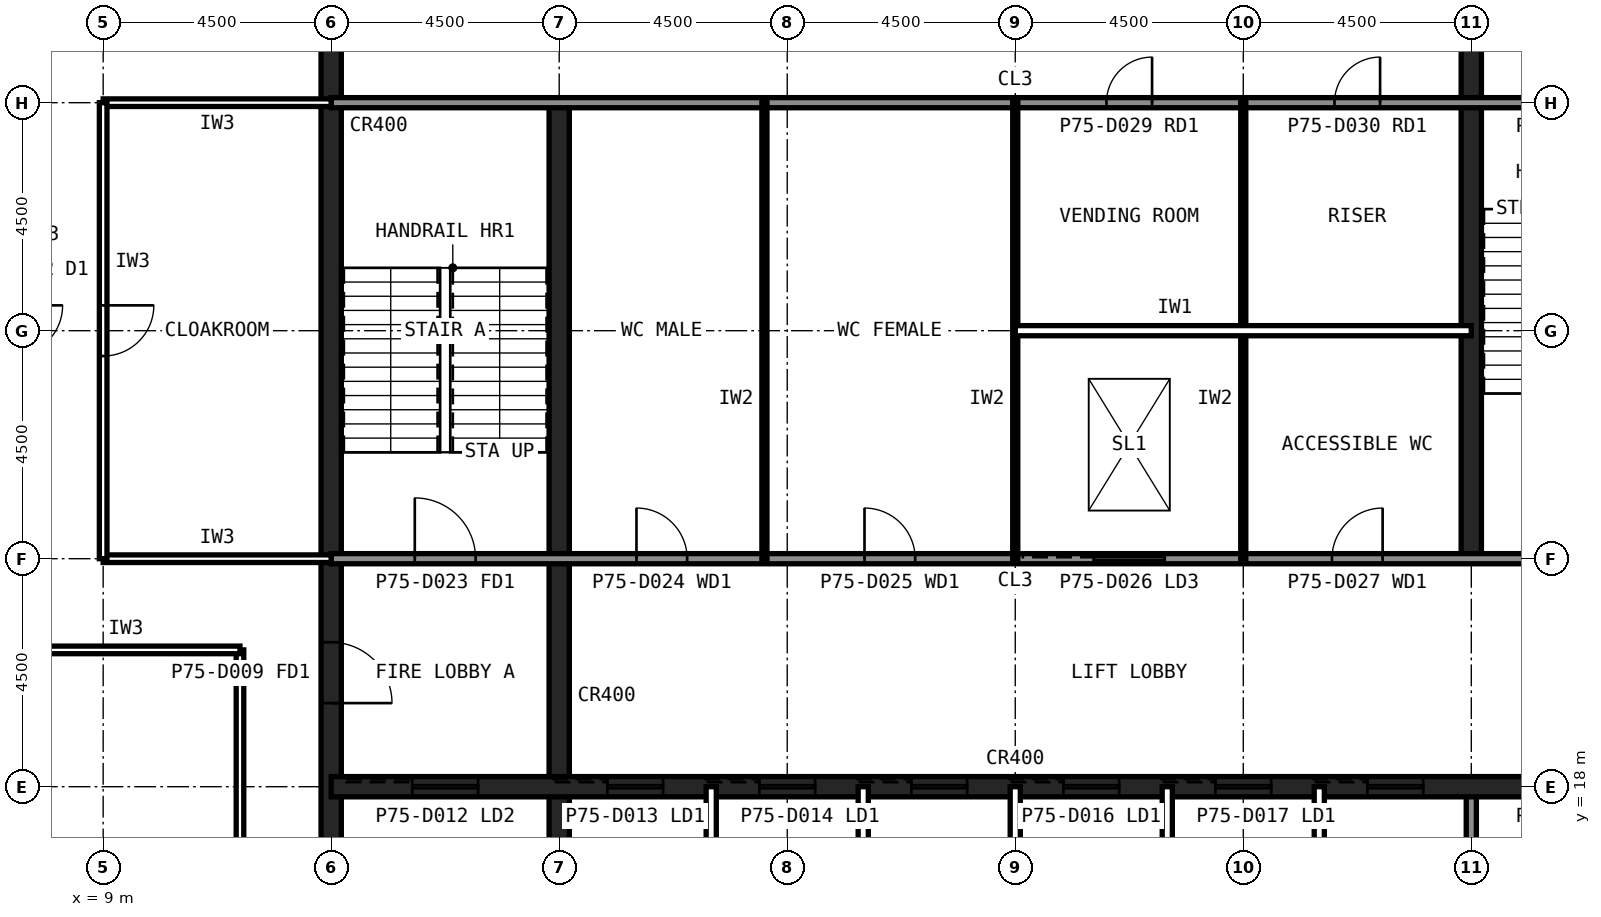
"""IFC4 building model, lengths in metres.
Left out: names, types, materials, properties, quantities, classifications, styles, units other than length and angle.
Written with IfcOpenShell. Run it as: python <this file> out.ifc"""

import sys

from ifc_helpers import new_model, si_unit, direction, frame, frame_2d, origin, place, context, subcontext, project, spatial, rectangle, extrude, element, fill, save


model = new_model("IFC4")
c1 = context("Model", 3, precision=1e-05, world=origin(), true_north=direction((0.0, 1.0)))
c2 = subcontext(c1, "Body", "Model", "MODEL_VIEW")
j1 = project(units=[si_unit("LENGTHUNIT", "METRE"), si_unit("PLANEANGLEUNIT", "RADIAN")], contexts=[c1])
p1 = place(None, origin())
s1 = spatial("IfcSite", under=j1, at=p1, CompositionType="ELEMENT")
p2 = place(p1, origin())
s2 = spatial("IfcBuilding", under=s1, at=p2, CompositionType="ELEMENT")
p3 = place(p2, frame((0.0, 0.0, 315.1)))
s3 = spatial("IfcBuildingStorey", under=s2, at=p3, CompositionType="ELEMENT", Elevation=315.1)
p4 = place(p3, frame((13.5, 40.5, 0.0), z_axis=(0.0, 0.0, 1.0), x_axis=(0.0, -1.0, 0.0)))
e1 = element("IfcWall", 1, at=p4, inside=s3, PredefinedType="SHEAR", context=c2, shape_type="SweptSolid", body=[
    extrude(rectangle(XDim=27.0, YDim=0.4, at=frame_2d((13.5, 0.0))), origin(), (0.0, 0.0, 1.0), 5.0),
])
p5 = place(p4, frame((19.65, 0.0, 0.0)))
e2 = element("IfcOpeningElement", 2, at=p5, cuts=e1, PredefinedType="OPENING", context=c2, shape_type="SweptSolid", body=[
    extrude(rectangle(XDim=1.2, YDim=2.1, at=frame_2d((0.6, 1.05))), frame((0.0, 0.21, 0.0), z_axis=(0.0, -1.0, 0.0), x_axis=(1.0, 0.0, 0.0)), (0.0, 0.0, 1.0), 0.42),
])
p6 = place(p4, frame((5.85, 0.0, 0.0)))
e3 = element("IfcOpeningElement", 3, at=p6, cuts=e1, PredefinedType="OPENING", context=c2, shape_type="SweptSolid", body=[
    extrude(rectangle(XDim=1.8, YDim=2.1, at=frame_2d((0.9, 1.05))), frame((0.0, 0.21, 0.0), z_axis=(0.0, -1.0, 0.0), x_axis=(1.0, 0.0, 0.0)), (0.0, 0.0, 1.0), 0.42),
])
p7 = place(p3, frame((18.0, 13.5, 0.0), z_axis=(0.0, 0.0, 1.0), x_axis=(0.0, 1.0, 0.0)))
e4 = element("IfcWall", 4, at=p7, inside=s3, PredefinedType="SHEAR", context=c2, shape_type="SweptSolid", body=[
    extrude(rectangle(XDim=18.0, YDim=0.4, at=frame_2d((9.0, 0.0))), origin(), (0.0, 0.0, 1.0), 5.0),
])
p8 = place(p3, frame((36.0, 13.5, 0.0), z_axis=(0.0, 0.0, 1.0), x_axis=(0.0, 1.0, 0.0)))
e5 = element("IfcWall", 5, at=p8, inside=s3, PredefinedType="SOLIDWALL", context=c2, shape_type="SweptSolid", body=[
    extrude(rectangle(XDim=4.5, YDim=0.2, at=frame_2d((2.25, 0.0))), origin(), (0.0, 0.0, 1.0), 4.8),
])
p9 = place(p3, frame((36.0, 22.5, 0.0), z_axis=(0.0, 0.0, 1.0), x_axis=(0.0, 1.0, 0.0)))
e6 = element("IfcWall", 6, at=p9, inside=s3, PredefinedType="SHEAR", context=c2, shape_type="SweptSolid", body=[
    extrude(rectangle(XDim=18.0, YDim=0.4, at=frame_2d((9.0, 0.0))), origin(), (0.0, 0.0, 1.0), 5.0),
])
p10 = place(p3, frame((13.5, 18.0, 0.0), z_axis=(0.0, 0.0, 1.0), x_axis=(1.0, 0.0, 0.0)))
e7 = element("IfcWall", 7, at=p10, inside=s3, PredefinedType="SHEAR", context=c2, shape_type="SweptSolid", body=[
    extrude(rectangle(XDim=27.0, YDim=0.4, at=frame_2d((13.5, 0.0))), origin(), (0.0, 0.0, 1.0), 5.0),
])
p11 = place(p10, frame((24.3, 0.0, 0.0)))
e8 = element("IfcOpeningElement", 8, at=p11, cuts=e7, PredefinedType="OPENING", context=c2, shape_type="SweptSolid", body=[
    extrude(rectangle(XDim=0.9, YDim=2.1, at=frame_2d((0.45, 1.05))), frame((0.0, 0.21, 0.0), z_axis=(0.0, -1.0, 0.0), x_axis=(1.0, 0.0, 0.0)), (0.0, 0.0, 1.0), 0.42),
])
p12 = place(p10, frame((5.45, 0.0, 0.0)))
e9 = element("IfcOpeningElement", 9, at=p12, cuts=e7, PredefinedType="OPENING", context=c2, shape_type="SweptSolid", body=[
    extrude(rectangle(XDim=1.1, YDim=2.1, at=frame_2d((0.55, 1.05))), frame((0.0, 0.21, 0.0), z_axis=(0.0, -1.0, 0.0), x_axis=(1.0, 0.0, 0.0)), (0.0, 0.0, 1.0), 0.42),
])
p13 = place(p10, frame((8.45, 0.0, 0.0)))
e10 = element("IfcOpeningElement", 10, at=p13, cuts=e7, PredefinedType="OPENING", context=c2, shape_type="SweptSolid", body=[
    extrude(rectangle(XDim=1.1, YDim=2.1, at=frame_2d((0.55, 1.05))), frame((0.0, 0.21, 0.0), z_axis=(0.0, -1.0, 0.0), x_axis=(1.0, 0.0, 0.0)), (0.0, 0.0, 1.0), 0.42),
])
p14 = place(p10, frame((11.45, 0.0, 0.0)))
e11 = element("IfcOpeningElement", 11, at=p14, cuts=e7, PredefinedType="OPENING", context=c2, shape_type="SweptSolid", body=[
    extrude(rectangle(XDim=1.1, YDim=2.1, at=frame_2d((0.55, 1.05))), frame((0.0, 0.21, 0.0), z_axis=(0.0, -1.0, 0.0), x_axis=(1.0, 0.0, 0.0)), (0.0, 0.0, 1.0), 0.42),
])
p15 = place(p10, frame((14.45, 0.0, 0.0)))
e12 = element("IfcOpeningElement", 12, at=p15, cuts=e7, PredefinedType="OPENING", context=c2, shape_type="SweptSolid", body=[
    extrude(rectangle(XDim=1.1, YDim=2.1, at=frame_2d((0.55, 1.05))), frame((0.0, 0.21, 0.0), z_axis=(0.0, -1.0, 0.0), x_axis=(1.0, 0.0, 0.0)), (0.0, 0.0, 1.0), 0.42),
])
p16 = place(p10, frame((17.45, 0.0, 0.0)))
e13 = element("IfcOpeningElement", 13, at=p16, cuts=e7, PredefinedType="OPENING", context=c2, shape_type="SweptSolid", body=[
    extrude(rectangle(XDim=1.1, YDim=2.1, at=frame_2d((0.55, 1.05))), frame((0.0, 0.21, 0.0), z_axis=(0.0, -1.0, 0.0), x_axis=(1.0, 0.0, 0.0)), (0.0, 0.0, 1.0), 0.42),
])
p17 = place(p10, frame((20.45, 0.0, 0.0)))
e14 = element("IfcOpeningElement", 14, at=p17, cuts=e7, PredefinedType="OPENING", context=c2, shape_type="SweptSolid", body=[
    extrude(rectangle(XDim=1.1, YDim=2.1, at=frame_2d((0.55, 1.05))), frame((0.0, 0.21, 0.0), z_axis=(0.0, -1.0, 0.0), x_axis=(1.0, 0.0, 0.0)), (0.0, 0.0, 1.0), 0.42),
])
p18 = place(p10, frame((1.6, 0.0, 0.0)))
e15 = element("IfcOpeningElement", 15, at=p18, cuts=e7, PredefinedType="OPENING", context=c2, shape_type="SweptSolid", body=[
    extrude(rectangle(XDim=1.3, YDim=2.2, at=frame_2d((0.65, 1.1))), frame((0.0, 0.21, 0.0), z_axis=(0.0, -1.0, 0.0), x_axis=(1.0, 0.0, 0.0)), (0.0, 0.0, 1.0), 0.42),
])
p19 = place(p3, frame((13.5, 22.5, 0.0), z_axis=(0.0, 0.0, 1.0), x_axis=(1.0, 0.0, 0.0)))
e16 = element("IfcWall", 16, at=p19, inside=s3, PredefinedType="SOLIDWALL", context=c2, shape_type="SweptSolid", body=[
    extrude(rectangle(XDim=27.0, YDim=0.2, at=frame_2d((13.5, 0.0))), origin(), (0.0, 0.0, 1.0), 4.8),
])
p20 = place(p19, frame((1.65, 0.0, 0.0)))
e17 = element("IfcOpeningElement", 17, at=p20, cuts=e16, PredefinedType="OPENING", context=c2, shape_type="SweptSolid", body=[
    extrude(rectangle(XDim=1.2, YDim=2.1, at=frame_2d((0.6, 1.05))), frame((0.0, 0.11, 0.0), z_axis=(0.0, -1.0, 0.0), x_axis=(1.0, 0.0, 0.0)), (0.0, 0.0, 1.0), 0.22),
])
p21 = place(p19, frame((6.025, 0.0, 0.0)))
e18 = element("IfcOpeningElement", 18, at=p21, cuts=e16, PredefinedType="OPENING", context=c2, shape_type="SweptSolid", body=[
    extrude(rectangle(XDim=1.0, YDim=2.1, at=frame_2d((0.5, 1.05))), frame((0.0, 0.11, 0.0), z_axis=(0.0, -1.0, 0.0), x_axis=(1.0, 0.0, 0.0)), (0.0, 0.0, 1.0), 0.22),
])
p22 = place(p19, frame((10.525, 0.0, 0.0)))
e19 = element("IfcOpeningElement", 19, at=p22, cuts=e16, PredefinedType="OPENING", context=c2, shape_type="SweptSolid", body=[
    extrude(rectangle(XDim=1.0, YDim=2.1, at=frame_2d((0.5, 1.05))), frame((0.0, 0.11, 0.0), z_axis=(0.0, -1.0, 0.0), x_axis=(1.0, 0.0, 0.0)), (0.0, 0.0, 1.0), 0.22),
])
p23 = place(p19, frame((19.75, 0.0, 0.0)))
e20 = element("IfcOpeningElement", 20, at=p23, cuts=e16, PredefinedType="OPENING", context=c2, shape_type="SweptSolid", body=[
    extrude(rectangle(XDim=1.0, YDim=2.1, at=frame_2d((0.5, 1.05))), frame((0.0, 0.11, 0.0), z_axis=(0.0, -1.0, 0.0), x_axis=(1.0, 0.0, 0.0)), (0.0, 0.0, 1.0), 0.22),
])
p24 = place(p19, frame((15.05, 0.0, 0.0)))
e21 = element("IfcOpeningElement", 21, at=p24, cuts=e16, PredefinedType="OPENING", context=c2, shape_type="SweptSolid", body=[
    extrude(rectangle(XDim=1.4, YDim=2.4, at=frame_2d((0.7, 1.2))), frame((0.0, 0.11, 0.0), z_axis=(0.0, -1.0, 0.0), x_axis=(1.0, 0.0, 0.0)), (0.0, 0.0, 1.0), 0.22),
])
p25 = place(p3, frame((13.5, 31.5, 0.0), z_axis=(0.0, 0.0, 1.0), x_axis=(1.0, 0.0, 0.0)))
e22 = element("IfcWall", 22, at=p25, inside=s3, PredefinedType="SOLIDWALL", context=c2, shape_type="SweptSolid", body=[
    extrude(rectangle(XDim=27.0, YDim=0.2, at=frame_2d((13.5, 0.0))), origin(), (0.0, 0.0, 1.0), 4.8),
])
p26 = place(p25, frame((24.15, 0.0, 0.0)))
e23 = element("IfcOpeningElement", 23, at=p26, cuts=e22, PredefinedType="OPENING", context=c2, shape_type="SweptSolid", body=[
    extrude(rectangle(XDim=1.2, YDim=2.1, at=frame_2d((0.6, 1.05))), frame((0.0, 0.11, 0.0), z_axis=(0.0, -1.0, 0.0), x_axis=(1.0, 0.0, 0.0)), (0.0, 0.0, 1.0), 0.22),
])
p27 = place(p25, frame((15.3, 0.0, 0.0)))
e24 = element("IfcOpeningElement", 24, at=p27, cuts=e22, PredefinedType="OPENING", context=c2, shape_type="SweptSolid", body=[
    extrude(rectangle(XDim=0.9, YDim=2.1, at=frame_2d((0.45, 1.05))), frame((0.0, 0.11, 0.0), z_axis=(0.0, -1.0, 0.0), x_axis=(1.0, 0.0, 0.0)), (0.0, 0.0, 1.0), 0.22),
])
p28 = place(p25, frame((19.8, 0.0, 0.0)))
e25 = element("IfcOpeningElement", 25, at=p28, cuts=e22, PredefinedType="OPENING", context=c2, shape_type="SweptSolid", body=[
    extrude(rectangle(XDim=0.9, YDim=2.1, at=frame_2d((0.45, 1.05))), frame((0.0, 0.11, 0.0), z_axis=(0.0, -1.0, 0.0), x_axis=(1.0, 0.0, 0.0)), (0.0, 0.0, 1.0), 0.22),
])
for number, where, z_axis, x_axis in (
    (26, (21.0, 13.5, 0.0), (0.0, 0.0, 1.0), (0.0, 1.0, 0.0)),
    (27, (24.0, 13.5, 0.0), (0.0, 0.0, 1.0), (0.0, 1.0, 0.0)),
    (28, (27.0, 13.5, 0.0), (0.0, 0.0, 1.0), (0.0, 1.0, 0.0)),
    (29, (30.0, 13.5, 0.0), (0.0, 0.0, 1.0), (0.0, 1.0, 0.0)),
    (30, (33.0, 13.5, 0.0), (0.0, 0.0, 1.0), (0.0, 1.0, 0.0)),
):
    element("IfcWall", number, at=place(p3, frame(where, z_axis=z_axis, x_axis=x_axis)), inside=s3, PredefinedType="PARTITIONING", context=c2, shape_type="SweptSolid", body=[
        extrude(rectangle(XDim=4.5, YDim=0.2, at=frame_2d((2.25, 0.0))), origin(), (0.0, 0.0, 1.0), 4.8),
    ])
for number, where, z_axis, x_axis in (
    (31, (22.05, 22.5, 0.0), (0.0, 0.0, 1.0), (0.0, 1.0, 0.0)),
    (32, (27.0, 22.5, 0.0), (0.0, 0.0, 1.0), (0.0, 1.0, 0.0)),
    (33, (31.5, 22.5, 0.0), (0.0, 0.0, 1.0), (0.0, 1.0, 0.0)),
):
    element("IfcWall", number, at=place(p3, frame(where, z_axis=z_axis, x_axis=x_axis)), inside=s3, PredefinedType="PLUMBINGWALL", context=c2, shape_type="SweptSolid", body=[
        extrude(rectangle(XDim=9.0, YDim=0.1, at=frame_2d((4.5, 0.0))), origin(), (0.0, 0.0, 1.0), 4.8),
    ])
p29 = place(p3, frame((27.0, 27.0, 0.0), z_axis=(0.0, 0.0, 1.0), x_axis=(1.0, 0.0, 0.0)))
e34 = element("IfcWall", 34, at=p29, inside=s3, PredefinedType="PARTITIONING", context=c2, shape_type="SweptSolid", body=[
    extrude(rectangle(XDim=9.0, YDim=0.2, at=frame_2d((4.5, 0.0))), origin(), (0.0, 0.0, 1.0), 4.8),
])
p30 = place(p3, frame((11.7, 20.7, 0.0), z_axis=(0.0, 0.0, 1.0), x_axis=(0.0, -1.0, 0.0)))
e35 = element("IfcWall", 35, at=p30, inside=s3, PredefinedType="PARTITIONING", context=c2, shape_type="SweptSolid", body=[
    extrude(rectangle(XDim=9.0, YDim=0.15, at=frame_2d((4.5, 0.0))), origin(), (0.0, 0.0, 1.0), 4.8),
])
p31 = place(p3, frame((7.2, 20.7, 0.0), z_axis=(0.0, 0.0, 1.0), x_axis=(1.0, 0.0, 0.0)))
e36 = element("IfcWall", 36, at=p31, inside=s3, PredefinedType="PARTITIONING", context=c2, shape_type="SweptSolid", body=[
    extrude(rectangle(XDim=4.5, YDim=0.15, at=frame_2d((2.25, 0.0))), origin(), (0.0, 0.0, 1.0), 4.8),
])
for number, where, z_axis, x_axis in (
    (37, (9.0, 22.5, 0.0), (0.0, 0.0, 1.0), (1.0, 0.0, 0.0)),
    (38, (13.5, 31.5, 0.0), (0.0, 0.0, 1.0), (-1.0, 0.0, 0.0)),
):
    element("IfcWall", number, at=place(p3, frame(where, z_axis=z_axis, x_axis=x_axis)), inside=s3, PredefinedType="PARTITIONING", context=c2, shape_type="SweptSolid", body=[
        extrude(rectangle(XDim=4.5, YDim=0.15, at=frame_2d((2.25, 0.0))), origin(), (0.0, 0.0, 1.0), 3.868),
    ])
p32 = place(p3, frame((9.0, 31.5, 0.0), z_axis=(0.0, 0.0, 1.0), x_axis=(0.0, -1.0, 0.0)))
e39 = element("IfcWall", 39, at=p32, inside=s3, PredefinedType="PARTITIONING", context=c2, shape_type="SweptSolid", body=[
    extrude(rectangle(XDim=9.0, YDim=0.15, at=frame_2d((4.5, 0.0))), origin(), (0.0, 0.0, 1.0), 4.8),
])
p33 = place(p32, frame((4.0, 0.0, 0.0)))
e40 = element("IfcOpeningElement", 40, at=p33, cuts=e39, PredefinedType="OPENING", context=c2, shape_type="SweptSolid", body=[
    extrude(rectangle(XDim=1.0, YDim=2.1, at=frame_2d((0.5, 1.05))), frame((0.0, 0.085, 0.0), z_axis=(0.0, -1.0, 0.0), x_axis=(1.0, 0.0, 0.0)), (0.0, 0.0, 1.0), 0.17),
])
p34 = place(p5, origin())
e41 = element("IfcDoor", 41, at=p34, inside=s3, OperationType="SINGLE_SWING_RIGHT", PredefinedType="DOOR", context=c2, shape_type="SweptSolid", body=[
    extrude(rectangle(XDim=1.2, YDim=2.1, at=frame_2d((0.6, 1.05))), frame((0.0, 0.025, 0.0), z_axis=(0.0, -1.0, 0.0), x_axis=(1.0, 0.0, 0.0)), (0.0, 0.0, 1.0), 0.05),
])
fill(e2, e41)
p35 = place(p20, origin())
e42 = element("IfcDoor", 42, at=p35, inside=s3, OperationType="SINGLE_SWING_LEFT", PredefinedType="DOOR", context=c2, shape_type="SweptSolid", body=[
    extrude(rectangle(XDim=1.2, YDim=2.1, at=frame_2d((0.6, 1.05))), frame((0.0, 0.025, 0.0), z_axis=(0.0, -1.0, 0.0), x_axis=(1.0, 0.0, 0.0)), (0.0, 0.0, 1.0), 0.05),
])
fill(e17, e42)
p36 = place(p21, origin())
e43 = element("IfcDoor", 43, at=p36, inside=s3, OperationType="SINGLE_SWING_LEFT", PredefinedType="DOOR", context=c2, shape_type="SweptSolid", body=[
    extrude(rectangle(XDim=1.0, YDim=2.1, at=frame_2d((0.5, 1.05))), frame((0.0, 0.025, 0.0), z_axis=(0.0, -1.0, 0.0), x_axis=(1.0, 0.0, 0.0)), (0.0, 0.0, 1.0), 0.05),
])
fill(e18, e43)
p37 = place(p22, origin())
e44 = element("IfcDoor", 44, at=p37, inside=s3, OperationType="SINGLE_SWING_LEFT", PredefinedType="DOOR", context=c2, shape_type="SweptSolid", body=[
    extrude(rectangle(XDim=1.0, YDim=2.1, at=frame_2d((0.5, 1.05))), frame((0.0, 0.025, 0.0), z_axis=(0.0, -1.0, 0.0), x_axis=(1.0, 0.0, 0.0)), (0.0, 0.0, 1.0), 0.05),
])
fill(e19, e44)
p38 = place(p23, origin())
e45 = element("IfcDoor", 45, at=p38, inside=s3, OperationType="SINGLE_SWING_RIGHT", PredefinedType="DOOR", context=c2, shape_type="SweptSolid", body=[
    extrude(rectangle(XDim=1.0, YDim=2.1, at=frame_2d((0.5, 1.05))), frame((0.0, 0.025, 0.0), z_axis=(0.0, -1.0, 0.0), x_axis=(1.0, 0.0, 0.0)), (0.0, 0.0, 1.0), 0.05),
])
fill(e20, e45)
p39 = place(p27, origin())
e46 = element("IfcDoor", 46, at=p39, inside=s3, OperationType="SINGLE_SWING_RIGHT", PredefinedType="DOOR", context=c2, shape_type="SweptSolid", body=[
    extrude(rectangle(XDim=0.9, YDim=2.1, at=frame_2d((0.45, 1.05))), frame((0.0, 0.025, 0.0), z_axis=(0.0, -1.0, 0.0), x_axis=(1.0, 0.0, 0.0)), (0.0, 0.0, 1.0), 0.05),
])
fill(e24, e46)
p40 = place(p28, origin())
e47 = element("IfcDoor", 47, at=p40, inside=s3, OperationType="SINGLE_SWING_RIGHT", PredefinedType="DOOR", context=c2, shape_type="SweptSolid", body=[
    extrude(rectangle(XDim=0.9, YDim=2.1, at=frame_2d((0.45, 1.05))), frame((0.0, 0.025, 0.0), z_axis=(0.0, -1.0, 0.0), x_axis=(1.0, 0.0, 0.0)), (0.0, 0.0, 1.0), 0.05),
])
fill(e25, e47)
p41 = place(p12, origin())
e48 = element("IfcDoor", 48, at=p41, inside=s3, OperationType="SLIDING_TO_LEFT", PredefinedType="DOOR", context=c2, shape_type="SweptSolid", body=[
    extrude(rectangle(XDim=1.1, YDim=2.1, at=frame_2d((0.55, 1.05))), frame((0.0, 0.025, 0.0), z_axis=(0.0, -1.0, 0.0), x_axis=(1.0, 0.0, 0.0)), (0.0, 0.0, 1.0), 0.05),
])
fill(e9, e48)
p42 = place(p13, origin())
e49 = element("IfcDoor", 49, at=p42, inside=s3, OperationType="SLIDING_TO_LEFT", PredefinedType="DOOR", context=c2, shape_type="SweptSolid", body=[
    extrude(rectangle(XDim=1.1, YDim=2.1, at=frame_2d((0.55, 1.05))), frame((0.0, 0.025, 0.0), z_axis=(0.0, -1.0, 0.0), x_axis=(1.0, 0.0, 0.0)), (0.0, 0.0, 1.0), 0.05),
])
fill(e10, e49)
p43 = place(p14, origin())
e50 = element("IfcDoor", 50, at=p43, inside=s3, OperationType="SLIDING_TO_LEFT", PredefinedType="DOOR", context=c2, shape_type="SweptSolid", body=[
    extrude(rectangle(XDim=1.1, YDim=2.1, at=frame_2d((0.55, 1.05))), frame((0.0, 0.025, 0.0), z_axis=(0.0, -1.0, 0.0), x_axis=(1.0, 0.0, 0.0)), (0.0, 0.0, 1.0), 0.05),
])
fill(e11, e50)
p44 = place(p15, origin())
e51 = element("IfcDoor", 51, at=p44, inside=s3, OperationType="SLIDING_TO_LEFT", PredefinedType="DOOR", context=c2, shape_type="SweptSolid", body=[
    extrude(rectangle(XDim=1.1, YDim=2.1, at=frame_2d((0.55, 1.05))), frame((0.0, 0.025, 0.0), z_axis=(0.0, -1.0, 0.0), x_axis=(1.0, 0.0, 0.0)), (0.0, 0.0, 1.0), 0.05),
])
fill(e12, e51)
p45 = place(p16, origin())
e52 = element("IfcDoor", 52, at=p45, inside=s3, OperationType="SLIDING_TO_LEFT", PredefinedType="DOOR", context=c2, shape_type="SweptSolid", body=[
    extrude(rectangle(XDim=1.1, YDim=2.1, at=frame_2d((0.55, 1.05))), frame((0.0, 0.025, 0.0), z_axis=(0.0, -1.0, 0.0), x_axis=(1.0, 0.0, 0.0)), (0.0, 0.0, 1.0), 0.05),
])
fill(e13, e52)
p46 = place(p17, origin())
e53 = element("IfcDoor", 53, at=p46, inside=s3, OperationType="SLIDING_TO_LEFT", PredefinedType="DOOR", context=c2, shape_type="SweptSolid", body=[
    extrude(rectangle(XDim=1.1, YDim=2.1, at=frame_2d((0.55, 1.05))), frame((0.0, 0.025, 0.0), z_axis=(0.0, -1.0, 0.0), x_axis=(1.0, 0.0, 0.0)), (0.0, 0.0, 1.0), 0.05),
])
fill(e14, e53)
p47 = place(p18, origin())
e54 = element("IfcDoor", 54, at=p47, inside=s3, OperationType="SLIDING_TO_LEFT", PredefinedType="DOOR", context=c2, shape_type="SweptSolid", body=[
    extrude(rectangle(XDim=1.3, YDim=2.2, at=frame_2d((0.65, 1.1))), frame((0.0, 0.025, 0.0), z_axis=(0.0, -1.0, 0.0), x_axis=(1.0, 0.0, 0.0)), (0.0, 0.0, 1.0), 0.05),
])
fill(e15, e54)
p48 = place(p24, origin())
e55 = element("IfcDoor", 55, at=p48, inside=s3, OperationType="SLIDING_TO_LEFT", PredefinedType="DOOR", context=c2, shape_type="SweptSolid", body=[
    extrude(rectangle(XDim=1.4, YDim=2.4, at=frame_2d((0.7, 1.2))), frame((0.0, 0.025, 0.0), z_axis=(0.0, -1.0, 0.0), x_axis=(1.0, 0.0, 0.0)), (0.0, 0.0, 1.0), 0.05),
])
fill(e21, e55)
p49 = place(p33, origin())
e56 = element("IfcDoor", 56, at=p49, inside=s3, OperationType="SINGLE_SWING_LEFT", PredefinedType="DOOR", context=c2, shape_type="SweptSolid", body=[
    extrude(rectangle(XDim=1.0, YDim=2.1, at=frame_2d((0.5, 1.05))), frame((0.0, 0.025, 0.0), z_axis=(0.0, -1.0, 0.0), x_axis=(1.0, 0.0, 0.0)), (0.0, 0.0, 1.0), 0.05),
])
fill(e40, e56)
save(model, sys.argv[1])
